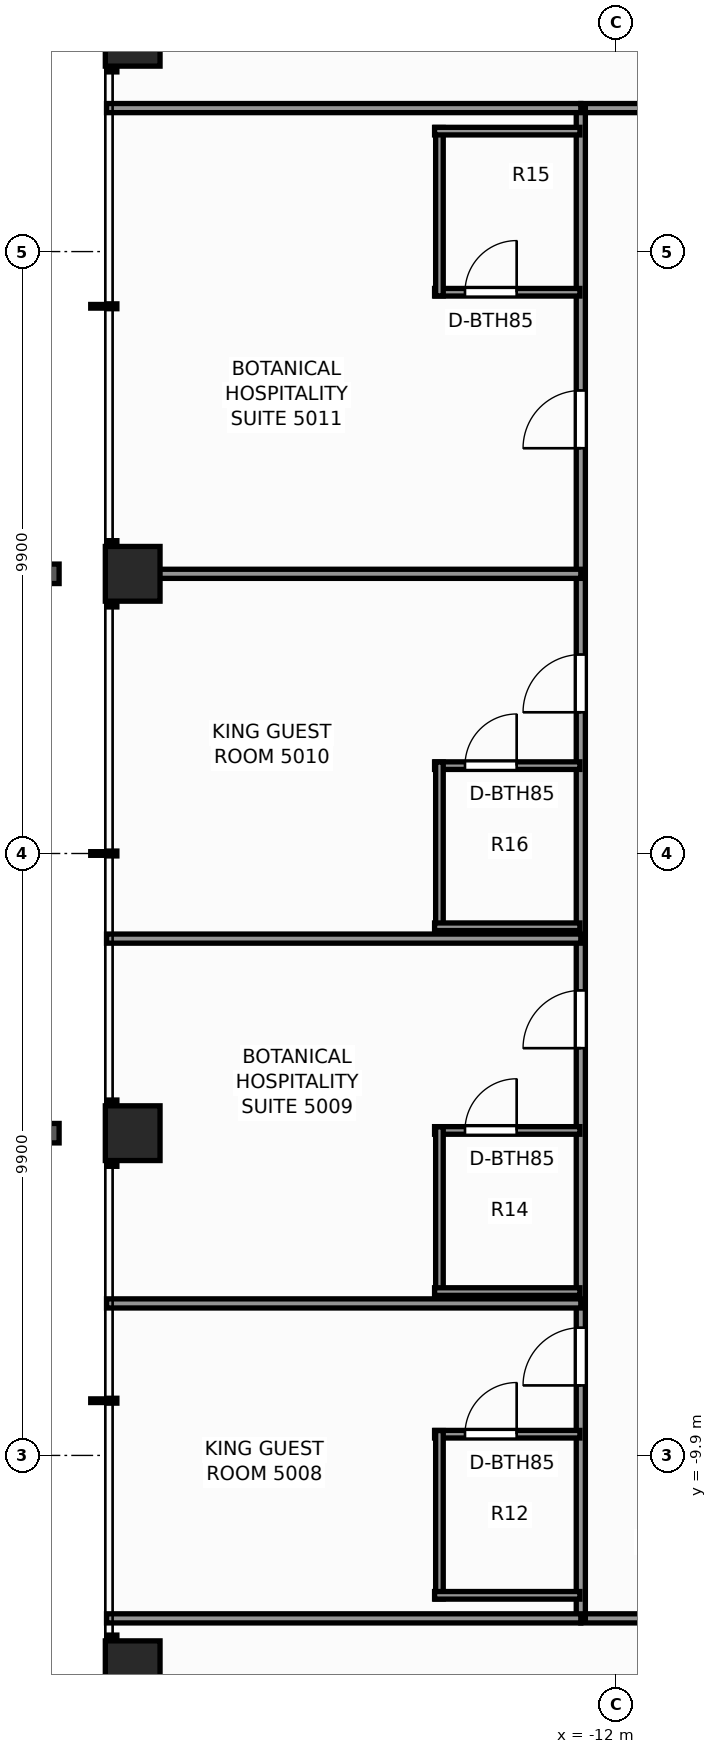
"""IFC4 building model, lengths in metres.
Left out: names, types, materials, properties, quantities, classifications, styles, units other than length and angle.
Written with IfcOpenShell. Run it as: python <this file> out.ifc"""

import sys

from ifc_helpers import new_model, si_unit, direction, frame, frame_2d, origin, origin_2d, place, context, subcontext, project, spatial, rectangle, extrude, element, fill, save


model = new_model("IFC4")
c1 = context("Model", 3, precision=1e-05, world=origin(), true_north=direction((0.0, 1.0)))
c2 = subcontext(c1, "Body", "Model", "MODEL_VIEW")
j1 = project(units=[si_unit("LENGTHUNIT", "METRE"), si_unit("PLANEANGLEUNIT", "RADIAN")], contexts=[c1])
p1 = place(None, origin())
s1 = spatial("IfcSite", under=j1, at=p1, CompositionType="ELEMENT")
p2 = place(p1, origin())
s2 = spatial("IfcBuilding", under=s1, at=p2, CompositionType="ELEMENT")
p3 = place(p2, frame((0.0, 0.0, 173.4)))
s3 = spatial("IfcBuildingStorey", under=s2, at=p3, CompositionType="ELEMENT", Elevation=173.4)
for number, where, z_axis, x_axis in (
    (1, (-19.95, -13.4, 0.0), (0.0, 0.0, 1.0), (1.0, 0.0, 0.0)),
    (2, (-19.95, -4.6, 0.0), (0.0, 0.0, 1.0), (1.0, 0.0, 0.0)),
    (3, (-19.95, 4.6, 0.0), (0.0, 0.0, 1.0), (1.0, 0.0, 0.0)),
    (4, (-19.95, 13.4, 0.0), (0.0, 0.0, 1.0), (1.0, 0.0, 0.0)),
):
    element("IfcColumn", number, at=place(p3, frame(where, z_axis=z_axis, x_axis=x_axis)), inside=s3, PredefinedType="COLUMN", context=c2, shape_type="SweptSolid", body=[
        extrude(rectangle(XDim=0.9, YDim=0.9, at=origin_2d()), origin(), (0.0, 0.0, 1.0), 3.3),
    ])
p4 = place(p3, frame((-12.58, -12.58, 0.0), z_axis=(0.0, 0.0, 1.0), x_axis=(1.0, 0.0, 0.0)))
e5 = element("IfcWall", 5, at=p4, inside=s3, PredefinedType="PARTITIONING", context=c2, shape_type="SweptSolid", body=[
    extrude(rectangle(XDim=25.0, YDim=0.15, at=frame_2d((12.5, 0.0))), origin(), (0.0, 0.0, 1.0), 2.369),
])
p5 = place(p4, frame((3.639, 0.0, 0.0)))
e6 = element("IfcOpeningElement", 6, at=p5, cuts=e5, PredefinedType="OPENING", context=c2, shape_type="SweptSolid", body=[
    extrude(rectangle(XDim=0.9, YDim=2.06, at=frame_2d((0.45, 1.03))), frame((0.0, 0.085, 0.0), z_axis=(0.0, -1.0, 0.0), x_axis=(1.0, 0.0, 0.0)), (0.0, 0.0, 1.0), 0.17),
])
p6 = place(p4, frame((5.974, 0.0, 0.0)))
e7 = element("IfcOpeningElement", 7, at=p6, cuts=e5, PredefinedType="OPENING", context=c2, shape_type="SweptSolid", body=[
    extrude(rectangle(XDim=0.9, YDim=2.06, at=frame_2d((0.45, 1.03))), frame((0.0, 0.085, 0.0), z_axis=(0.0, -1.0, 0.0), x_axis=(1.0, 0.0, 0.0)), (0.0, 0.0, 1.0), 0.17),
])
p7 = place(p4, frame((10.708, 0.0, 0.0)))
e8 = element("IfcOpeningElement", 8, at=p7, cuts=e5, PredefinedType="OPENING", context=c2, shape_type="SweptSolid", body=[
    extrude(rectangle(XDim=0.9, YDim=2.06, at=frame_2d((0.45, 1.03))), frame((0.0, 0.085, 0.0), z_axis=(0.0, -1.0, 0.0), x_axis=(1.0, 0.0, 0.0)), (0.0, 0.0, 1.0), 0.17),
])
p8 = place(p4, frame((13.698, 0.0, 0.0)))
e9 = element("IfcOpeningElement", 9, at=p8, cuts=e5, PredefinedType="OPENING", context=c2, shape_type="SweptSolid", body=[
    extrude(rectangle(XDim=0.95, YDim=2.06, at=frame_2d((0.475, 1.03))), frame((0.0, 0.085, 0.0), z_axis=(0.0, -1.0, 0.0), x_axis=(1.0, 0.0, 0.0)), (0.0, 0.0, 1.0), 0.17),
])
p9 = place(p4, frame((18.206, 0.0, 0.0)))
e10 = element("IfcOpeningElement", 10, at=p9, cuts=e5, PredefinedType="OPENING", context=c2, shape_type="SweptSolid", body=[
    extrude(rectangle(XDim=0.9, YDim=2.06, at=frame_2d((0.45, 1.03))), frame((0.0, 0.085, 0.0), z_axis=(0.0, -1.0, 0.0), x_axis=(1.0, 0.0, 0.0)), (0.0, 0.0, 1.0), 0.17),
])
p10 = place(p4, frame((20.541, 0.0, 0.0)))
e11 = element("IfcOpeningElement", 11, at=p10, cuts=e5, PredefinedType="OPENING", context=c2, shape_type="SweptSolid", body=[
    extrude(rectangle(XDim=0.9, YDim=2.06, at=frame_2d((0.45, 1.03))), frame((0.0, 0.085, 0.0), z_axis=(0.0, -1.0, 0.0), x_axis=(1.0, 0.0, 0.0)), (0.0, 0.0, 1.0), 0.17),
])
p11 = place(p3, frame((-12.58, 12.26, 0.0), z_axis=(0.0, 0.0, 1.0), x_axis=(1.0, 0.0, 0.0)))
e12 = element("IfcWall", 12, at=p11, inside=s3, PredefinedType="PARTITIONING", context=c2, shape_type="SweptSolid", body=[
    extrude(rectangle(XDim=25.0, YDim=0.15, at=frame_2d((12.5, 0.0))), origin(), (0.0, 0.0, 1.0), 2.369),
])
p12 = place(p11, frame((4.595, 0.0, 0.0)))
e13 = element("IfcOpeningElement", 13, at=p12, cuts=e12, PredefinedType="OPENING", context=c2, shape_type="SweptSolid", body=[
    extrude(rectangle(XDim=0.9, YDim=2.06, at=frame_2d((0.45, 1.03))), frame((0.0, 0.085, 0.0), z_axis=(0.0, -1.0, 0.0), x_axis=(1.0, 0.0, 0.0)), (0.0, 0.0, 1.0), 0.17),
])
p13 = place(p11, frame((19.665, 0.0, 0.0)))
e14 = element("IfcOpeningElement", 14, at=p13, cuts=e12, PredefinedType="OPENING", context=c2, shape_type="SweptSolid", body=[
    extrude(rectangle(XDim=0.9, YDim=2.06, at=frame_2d((0.45, 1.03))), frame((0.0, 0.085, 0.0), z_axis=(0.0, -1.0, 0.0), x_axis=(1.0, 0.0, 0.0)), (0.0, 0.0, 1.0), 0.17),
])
p14 = place(p3, frame((-12.58, -12.58, 0.0), z_axis=(0.0, 0.0, 1.0), x_axis=(0.0, 1.0, 0.0)))
e15 = element("IfcWall", 15, at=p14, inside=s3, PredefinedType="PARTITIONING", context=c2, shape_type="SweptSolid", body=[
    extrude(rectangle(XDim=24.84, YDim=0.15, at=frame_2d((12.42, 0.0))), origin(), (0.0, 0.0, 1.0), 2.369),
])
p15 = place(p14, frame((3.831, 0.0, 0.0)))
e16 = element("IfcOpeningElement", 16, at=p15, cuts=e15, PredefinedType="OPENING", context=c2, shape_type="SweptSolid", body=[
    extrude(rectangle(XDim=0.95, YDim=2.06, at=frame_2d((0.475, 1.03))), frame((0.0, 0.085, 0.0), z_axis=(0.0, -1.0, 0.0), x_axis=(1.0, 0.0, 0.0)), (0.0, 0.0, 1.0), 0.17),
])
p16 = place(p14, frame((9.378, 0.0, 0.0)))
e17 = element("IfcOpeningElement", 17, at=p16, cuts=e15, PredefinedType="OPENING", context=c2, shape_type="SweptSolid", body=[
    extrude(rectangle(XDim=0.95, YDim=2.06, at=frame_2d((0.475, 1.03))), frame((0.0, 0.085, 0.0), z_axis=(0.0, -1.0, 0.0), x_axis=(1.0, 0.0, 0.0)), (0.0, 0.0, 1.0), 0.17),
])
p17 = place(p14, frame((14.903, 0.0, 0.0)))
e18 = element("IfcOpeningElement", 18, at=p17, cuts=e15, PredefinedType="OPENING", context=c2, shape_type="SweptSolid", body=[
    extrude(rectangle(XDim=0.95, YDim=2.06, at=frame_2d((0.475, 1.03))), frame((0.0, 0.085, 0.0), z_axis=(0.0, -1.0, 0.0), x_axis=(1.0, 0.0, 0.0)), (0.0, 0.0, 1.0), 0.17),
])
p18 = place(p14, frame((19.246, 0.0, 0.0)))
e19 = element("IfcOpeningElement", 19, at=p18, cuts=e15, PredefinedType="OPENING", context=c2, shape_type="SweptSolid", body=[
    extrude(rectangle(XDim=0.95, YDim=2.06, at=frame_2d((0.475, 1.03))), frame((0.0, 0.085, 0.0), z_axis=(0.0, -1.0, 0.0), x_axis=(1.0, 0.0, 0.0)), (0.0, 0.0, 1.0), 0.17),
])
for number, where, z_axis, x_axis in (
    (20, (-20.38, -12.58, 0.0), (0.0, 0.0, 1.0), (1.0, 0.0, 0.0)),
    (21, (-20.38, 12.26, 0.0), (0.0, 0.0, 1.0), (1.0, 0.0, 0.0)),
):
    element("IfcWall", number, at=place(p3, frame(where, z_axis=z_axis, x_axis=x_axis)), inside=s3, PredefinedType="PARTITIONING", context=c2, shape_type="SweptSolid", body=[
        extrude(rectangle(XDim=7.8, YDim=0.15, at=frame_2d((3.9, 0.0))), origin(), (0.0, 0.0, 1.0), 2.369),
    ])
p19 = place(p3, frame((-20.38, -7.4, 0.0), z_axis=(0.0, 0.0, 1.0), x_axis=(1.0, 0.0, 0.0)))
e22 = element("IfcWall", 22, at=p19, inside=s3, PredefinedType="PARTITIONING", context=c2, shape_type="SweptSolid", body=[
    extrude(rectangle(XDim=7.8, YDim=0.15, at=frame_2d((3.9, 0.0))), origin(), (0.0, 0.0, 1.0), 2.453),
])
p20 = place(p3, frame((-14.985, -9.551, 0.0), z_axis=(0.0, 0.0, 1.0), x_axis=(1.0, 0.0, 0.0)))
e23 = element("IfcWall", 23, at=p20, inside=s3, PredefinedType="PARTITIONING", context=c2, shape_type="SweptSolid", body=[
    extrude(rectangle(XDim=2.39, YDim=0.125, at=frame_2d((1.195, 0.0))), origin(), (0.0, 0.0, 1.0), 3.08),
])
p21 = place(p20, frame((0.5, 0.0, 0.0)))
e24 = element("IfcOpeningElement", 24, at=p21, cuts=e23, PredefinedType="OPENING", context=c2, shape_type="SweptSolid", body=[
    extrude(rectangle(XDim=0.85, YDim=2.03, at=frame_2d((0.425, 1.015))), frame((0.0, 0.073, 0.0), z_axis=(0.0, -1.0, 0.0), x_axis=(1.0, 0.0, 0.0)), (0.0, 0.0, 1.0), 0.145),
])
p22 = place(p3, frame((-14.905, -12.261, 0.0), z_axis=(0.0, 0.0, 1.0), x_axis=(0.0, 1.0, 0.0)))
e25 = element("IfcWall", 25, at=p22, inside=s3, PredefinedType="PARTITIONING", context=c2, shape_type="SweptSolid", body=[
    extrude(rectangle(XDim=2.77, YDim=0.125, at=frame_2d((1.385, 0.0))), origin(), (0.0, 0.0, 1.0), 2.369),
])
p23 = place(p3, frame((-14.985, -12.201, 0.0), z_axis=(0.0, 0.0, 1.0), x_axis=(1.0, 0.0, 0.0)))
e26 = element("IfcWall", 26, at=p23, inside=s3, PredefinedType="PARTITIONING", context=c2, shape_type="SweptSolid", body=[
    extrude(rectangle(XDim=2.39, YDim=0.125, at=frame_2d((1.195, 0.0))), origin(), (0.0, 0.0, 1.0), 3.08),
])
p24 = place(p3, frame((-20.38, -1.4, 0.0), z_axis=(0.0, 0.0, 1.0), x_axis=(1.0, 0.0, 0.0)))
e27 = element("IfcWall", 27, at=p24, inside=s3, PredefinedType="PARTITIONING", context=c2, shape_type="SweptSolid", body=[
    extrude(rectangle(XDim=7.8, YDim=0.15, at=frame_2d((3.9, 0.0))), origin(), (0.0, 0.0, 1.0), 2.453),
])
p25 = place(p3, frame((-14.985, -4.555, 0.0), z_axis=(0.0, 0.0, 1.0), x_axis=(1.0, 0.0, 0.0)))
e28 = element("IfcWall", 28, at=p25, inside=s3, PredefinedType="PARTITIONING", context=c2, shape_type="SweptSolid", body=[
    extrude(rectangle(XDim=2.39, YDim=0.125, at=frame_2d((1.195, 0.0))), origin(), (0.0, 0.0, 1.0), 2.369),
])
p26 = place(p25, frame((0.5, 0.0, 0.0)))
e29 = element("IfcOpeningElement", 29, at=p26, cuts=e28, PredefinedType="OPENING", context=c2, shape_type="SweptSolid", body=[
    extrude(rectangle(XDim=0.85, YDim=2.03, at=frame_2d((0.425, 1.015))), frame((0.0, 0.073, 0.0), z_axis=(0.0, -1.0, 0.0), x_axis=(1.0, 0.0, 0.0)), (0.0, 0.0, 1.0), 0.145),
])
p27 = place(p3, frame((-14.905, -7.265, 0.0), z_axis=(0.0, 0.0, 1.0), x_axis=(0.0, 1.0, 0.0)))
e30 = element("IfcWall", 30, at=p27, inside=s3, PredefinedType="PARTITIONING", context=c2, shape_type="SweptSolid", body=[
    extrude(rectangle(XDim=2.77, YDim=0.125, at=frame_2d((1.385, 0.0))), origin(), (0.0, 0.0, 1.0), 2.369),
])
p28 = place(p3, frame((-14.985, -7.205, 0.0), z_axis=(0.0, 0.0, 1.0), x_axis=(1.0, 0.0, 0.0)))
e31 = element("IfcWall", 31, at=p28, inside=s3, PredefinedType="PARTITIONING", context=c2, shape_type="SweptSolid", body=[
    extrude(rectangle(XDim=2.39, YDim=0.125, at=frame_2d((1.195, 0.0))), origin(), (0.0, 0.0, 1.0), 3.08),
])
p29 = place(p3, frame((-20.38, 4.6, 0.0), z_axis=(0.0, 0.0, 1.0), x_axis=(1.0, 0.0, 0.0)))
e32 = element("IfcWall", 32, at=p29, inside=s3, PredefinedType="PARTITIONING", context=c2, shape_type="SweptSolid", body=[
    extrude(rectangle(XDim=7.8, YDim=0.15, at=frame_2d((3.9, 0.0))), origin(), (0.0, 0.0, 1.0), 2.369),
])
p30 = place(p3, frame((-14.985, 1.445, 0.0), z_axis=(0.0, 0.0, 1.0), x_axis=(1.0, 0.0, 0.0)))
e33 = element("IfcWall", 33, at=p30, inside=s3, PredefinedType="PARTITIONING", context=c2, shape_type="SweptSolid", body=[
    extrude(rectangle(XDim=2.39, YDim=0.125, at=frame_2d((1.195, 0.0))), origin(), (0.0, 0.0, 1.0), 3.08),
])
p31 = place(p30, frame((0.5, 0.0, 0.0)))
e34 = element("IfcOpeningElement", 34, at=p31, cuts=e33, PredefinedType="OPENING", context=c2, shape_type="SweptSolid", body=[
    extrude(rectangle(XDim=0.85, YDim=2.03, at=frame_2d((0.425, 1.015))), frame((0.0, 0.073, 0.0), z_axis=(0.0, -1.0, 0.0), x_axis=(1.0, 0.0, 0.0)), (0.0, 0.0, 1.0), 0.145),
])
p32 = place(p3, frame((-14.905, -1.265, 0.0), z_axis=(0.0, 0.0, 1.0), x_axis=(0.0, 1.0, 0.0)))
e35 = element("IfcWall", 35, at=p32, inside=s3, PredefinedType="PARTITIONING", context=c2, shape_type="SweptSolid", body=[
    extrude(rectangle(XDim=2.77, YDim=0.125, at=frame_2d((1.385, 0.0))), origin(), (0.0, 0.0, 1.0), 2.605),
])
p33 = place(p3, frame((-14.985, -1.205, 0.0), z_axis=(0.0, 0.0, 1.0), x_axis=(1.0, 0.0, 0.0)))
e36 = element("IfcWall", 36, at=p33, inside=s3, PredefinedType="PARTITIONING", context=c2, shape_type="SweptSolid", body=[
    extrude(rectangle(XDim=2.39, YDim=0.125, at=frame_2d((1.195, 0.0))), origin(), (0.0, 0.0, 1.0), 3.08),
])
p34 = place(p3, frame((-14.985, 9.231, 0.0), z_axis=(0.0, 0.0, 1.0), x_axis=(1.0, 0.0, 0.0)))
e37 = element("IfcWall", 37, at=p34, inside=s3, PredefinedType="PARTITIONING", context=c2, shape_type="SweptSolid", body=[
    extrude(rectangle(XDim=2.39, YDim=0.125, at=frame_2d((1.195, 0.0))), origin(), (0.0, 0.0, 1.0), 3.08),
])
p35 = place(p34, frame((0.5, 0.0, 0.0)))
e38 = element("IfcOpeningElement", 38, at=p35, cuts=e37, PredefinedType="OPENING", context=c2, shape_type="SweptSolid", body=[
    extrude(rectangle(XDim=0.85, YDim=2.03, at=frame_2d((0.425, 1.015))), frame((0.0, 0.073, 0.0), z_axis=(0.0, -1.0, 0.0), x_axis=(1.0, 0.0, 0.0)), (0.0, 0.0, 1.0), 0.145),
])
p36 = place(p3, frame((-14.905, 9.171, 0.0), z_axis=(0.0, 0.0, 1.0), x_axis=(0.0, 1.0, 0.0)))
e39 = element("IfcWall", 39, at=p36, inside=s3, PredefinedType="PARTITIONING", context=c2, shape_type="SweptSolid", body=[
    extrude(rectangle(XDim=2.77, YDim=0.125, at=frame_2d((1.385, 0.0))), origin(), (0.0, 0.0, 1.0), 2.369),
])
p37 = place(p3, frame((-14.985, 11.881, 0.0), z_axis=(0.0, 0.0, 1.0), x_axis=(1.0, 0.0, 0.0)))
e40 = element("IfcWall", 40, at=p37, inside=s3, PredefinedType="PARTITIONING", context=c2, shape_type="SweptSolid", body=[
    extrude(rectangle(XDim=2.39, YDim=0.125, at=frame_2d((1.195, 0.0))), origin(), (0.0, 0.0, 1.0), 2.369),
])
p38 = place(p21, origin())
e41 = element("IfcDoor", 41, at=p38, inside=s3, OperationType="SINGLE_SWING_RIGHT", PredefinedType="DOOR", context=c2, shape_type="SweptSolid", body=[
    extrude(rectangle(XDim=0.85, YDim=2.03, at=frame_2d((0.425, 1.015))), frame((0.0, 0.025, 0.0), z_axis=(0.0, -1.0, 0.0), x_axis=(1.0, 0.0, 0.0)), (0.0, 0.0, 1.0), 0.05),
])
fill(e24, e41)
p39 = place(p15, origin())
e42 = element("IfcDoor", 42, at=p39, inside=s3, OperationType="SINGLE_SWING_LEFT", PredefinedType="DOOR", context=c2, shape_type="SweptSolid", body=[
    extrude(rectangle(XDim=0.95, YDim=2.06, at=frame_2d((0.475, 1.03))), frame((0.0, 0.025, 0.0), z_axis=(0.0, -1.0, 0.0), x_axis=(1.0, 0.0, 0.0)), (0.0, 0.0, 1.0), 0.05),
])
fill(e16, e42)
p40 = place(p26, origin())
e43 = element("IfcDoor", 43, at=p40, inside=s3, OperationType="SINGLE_SWING_RIGHT", PredefinedType="DOOR", context=c2, shape_type="SweptSolid", body=[
    extrude(rectangle(XDim=0.85, YDim=2.03, at=frame_2d((0.425, 1.015))), frame((0.0, 0.025, 0.0), z_axis=(0.0, -1.0, 0.0), x_axis=(1.0, 0.0, 0.0)), (0.0, 0.0, 1.0), 0.05),
])
fill(e29, e43)
p41 = place(p16, origin())
e44 = element("IfcDoor", 44, at=p41, inside=s3, OperationType="SINGLE_SWING_LEFT", PredefinedType="DOOR", context=c2, shape_type="SweptSolid", body=[
    extrude(rectangle(XDim=0.95, YDim=2.06, at=frame_2d((0.475, 1.03))), frame((0.0, 0.025, 0.0), z_axis=(0.0, -1.0, 0.0), x_axis=(1.0, 0.0, 0.0)), (0.0, 0.0, 1.0), 0.05),
])
fill(e17, e44)
p42 = place(p31, origin())
e45 = element("IfcDoor", 45, at=p42, inside=s3, OperationType="SINGLE_SWING_RIGHT", PredefinedType="DOOR", context=c2, shape_type="SweptSolid", body=[
    extrude(rectangle(XDim=0.85, YDim=2.03, at=frame_2d((0.425, 1.015))), frame((0.0, 0.025, 0.0), z_axis=(0.0, -1.0, 0.0), x_axis=(1.0, 0.0, 0.0)), (0.0, 0.0, 1.0), 0.05),
])
fill(e34, e45)
p43 = place(p17, origin())
e46 = element("IfcDoor", 46, at=p43, inside=s3, OperationType="SINGLE_SWING_LEFT", PredefinedType="DOOR", context=c2, shape_type="SweptSolid", body=[
    extrude(rectangle(XDim=0.95, YDim=2.06, at=frame_2d((0.475, 1.03))), frame((0.0, 0.025, 0.0), z_axis=(0.0, -1.0, 0.0), x_axis=(1.0, 0.0, 0.0)), (0.0, 0.0, 1.0), 0.05),
])
fill(e18, e46)
p44 = place(p35, origin())
e47 = element("IfcDoor", 47, at=p44, inside=s3, OperationType="SINGLE_SWING_RIGHT", PredefinedType="DOOR", context=c2, shape_type="SweptSolid", body=[
    extrude(rectangle(XDim=0.85, YDim=2.03, at=frame_2d((0.425, 1.015))), frame((0.0, 0.025, 0.0), z_axis=(0.0, -1.0, 0.0), x_axis=(1.0, 0.0, 0.0)), (0.0, 0.0, 1.0), 0.05),
])
fill(e38, e47)
p45 = place(p18, origin())
e48 = element("IfcDoor", 48, at=p45, inside=s3, OperationType="SINGLE_SWING_LEFT", PredefinedType="DOOR", context=c2, shape_type="SweptSolid", body=[
    extrude(rectangle(XDim=0.95, YDim=2.06, at=frame_2d((0.475, 1.03))), frame((0.0, 0.025, 0.0), z_axis=(0.0, -1.0, 0.0), x_axis=(1.0, 0.0, 0.0)), (0.0, 0.0, 1.0), 0.05),
])
fill(e19, e48)
save(model, sys.argv[1])
